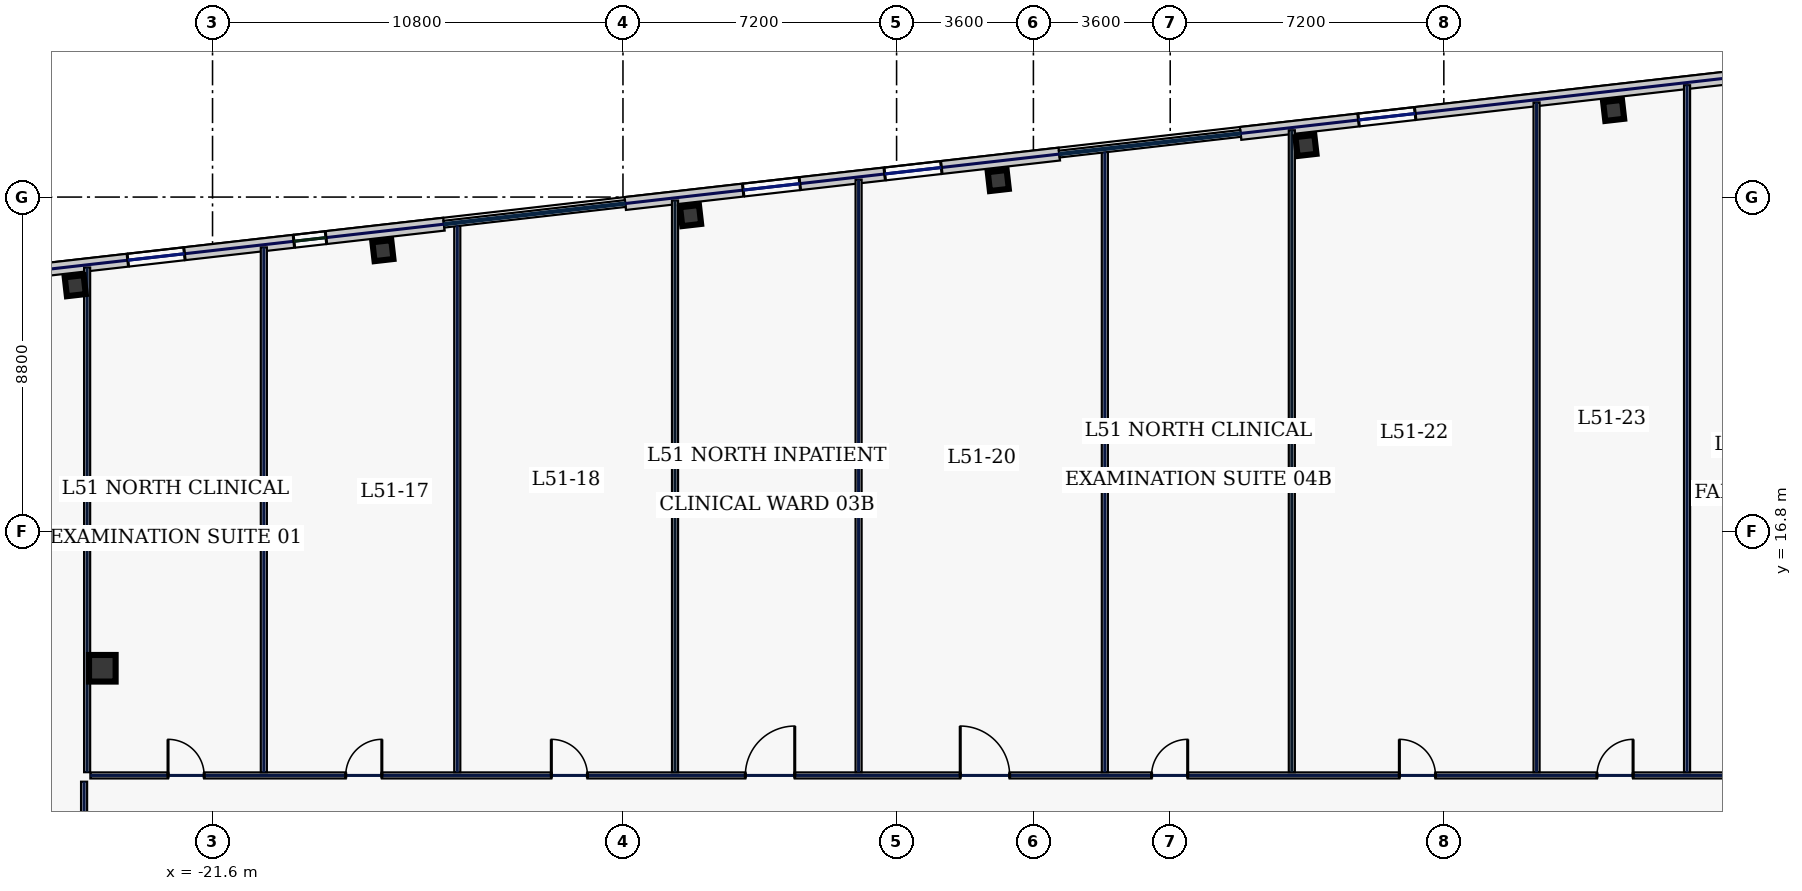
"""IFC4 building model, lengths in metres.
Left out: names, types, materials, properties, quantities, classifications, styles, units other than length and angle.
Written with IfcOpenShell. Run it as: python <this file> out.ifc"""

import sys

from ifc_helpers import new_model, si_unit, direction, frame, frame_2d, origin, origin_2d, place, context, subcontext, project, spatial, rectangle, hollow_rectangle, extrude, element, fill, save


model = new_model("IFC4")
c1 = context("Model", 3, precision=1e-05, world=origin(), true_north=direction((0.0, 1.0)))
c2 = subcontext(c1, "Body", "Model", "MODEL_VIEW")
j1 = project(units=[si_unit("LENGTHUNIT", "METRE"), si_unit("PLANEANGLEUNIT", "RADIAN")], contexts=[c1])
p1 = place(None, origin())
s1 = spatial("IfcSite", under=j1, at=p1, CompositionType="ELEMENT")
p2 = place(p1, origin())
s2 = spatial("IfcBuilding", under=s1, at=p2, CompositionType="ELEMENT")
p3 = place(p2, frame((0.0, 0.0, 222.2)))
s3 = spatial("IfcBuildingStorey", under=s2, at=p3, CompositionType="ELEMENT", Elevation=222.2)
p4 = place(p3, frame((-24.5, 13.2, 0.0), z_axis=(0.0, 0.0, 1.0), x_axis=(1.0, 0.0, 0.0)))
e1 = element("IfcColumn", 1, at=p4, inside=s3, PredefinedType="COLUMN", context=c2, shape_type="SweptSolid", body=[
    extrude(hollow_rectangle(XDim=0.7, YDim=0.7, WallThickness=0.032, at=origin_2d()), origin(), (0.0, 0.0, 1.0), 3.74),
])
for number, where, z_axis, x_axis in (
    (2, (15.269, 27.88, 0.0), (0.0, 0.0, 1.0), (0.994, 0.113, 0.0)),
    (3, (7.172, 26.958, 0.0), (0.0, 0.0, 1.0), (0.994, 0.113, 0.0)),
    (4, (-0.924, 26.035, 0.0), (0.0, 0.0, 1.0), (0.994, 0.113, 0.0)),
    (5, (-9.02, 25.113, 0.0), (0.0, 0.0, 1.0), (0.994, 0.113, 0.0)),
    (6, (-17.116, 24.19, 0.0), (0.0, 0.0, 1.0), (0.994, 0.113, 0.0)),
    (7, (-25.212, 23.268, 0.0), (0.0, 0.0, 1.0), (0.994, 0.113, 0.0)),
):
    element("IfcColumn", number, at=place(p3, frame(where, z_axis=z_axis, x_axis=x_axis)), inside=s3, PredefinedType="COLUMN", context=c2, shape_type="SweptSolid", body=[
        extrude(hollow_rectangle(XDim=0.5, YDim=0.5, WallThickness=0.025, at=origin_2d()), origin(), (0.0, 0.0, 1.0), 3.74),
    ])
p5 = place(p3, frame((23.983, 29.386, 0.0), z_axis=(0.0, 0.0, 1.0), x_axis=(-0.993572271362, -0.113199565282, 0.0)))
e8 = element("IfcWall", 8, at=p5, inside=s3, PredefinedType="STANDARD", context=c2, shape_type="SweptSolid", body=[
    extrude(rectangle(XDim=18.651, YDim=0.34, at=frame_2d((9.326, 0.0))), origin(), (0.0, 0.0, 1.0), 3.74),
])
p6 = place(p5, frame((14.027, 0.0, 0.83)))
e9 = element("IfcOpeningElement", 9, at=p6, cuts=e8, PredefinedType="OPENING", context=c2, shape_type="SweptSolid", body=[
    extrude(rectangle(XDim=1.5, YDim=2.0, at=frame_2d((0.75, 1.0))), frame((0.0, 0.18, 0.0), z_axis=(0.0, -1.0, 0.0), x_axis=(1.0, 0.0, 0.0)), (0.0, 0.0, 1.0), 0.36),
])
p7 = place(p5, frame((2.386, 0.0, 0.83)))
e10 = element("IfcOpeningElement", 10, at=p7, cuts=e8, PredefinedType="OPENING", context=c2, shape_type="SweptSolid", body=[
    extrude(rectangle(XDim=1.5, YDim=2.0, at=frame_2d((0.75, 1.0))), frame((0.0, 0.18, 0.0), z_axis=(0.0, -1.0, 0.0), x_axis=(1.0, 0.0, 0.0)), (0.0, 0.0, 1.0), 0.36),
])
p8 = place(p3, frame((0.682, 26.731, 0.0), z_axis=(0.0, 0.0, 1.0), x_axis=(-0.993571968199, -0.113202226169, 0.0)))
e11 = element("IfcWall", 11, at=p8, inside=s3, PredefinedType="STANDARD", context=c2, shape_type="SweptSolid", body=[
    extrude(rectangle(XDim=11.497, YDim=0.34, at=frame_2d((5.749, 0.0))), origin(), (0.0, 0.0, 1.0), 3.74),
])
p9 = place(p8, frame((6.873, 0.0, 0.83)))
e12 = element("IfcOpeningElement", 12, at=p9, cuts=e11, PredefinedType="OPENING", context=c2, shape_type="SweptSolid", body=[
    extrude(rectangle(XDim=1.5, YDim=2.0, at=frame_2d((0.75, 1.0))), frame((0.0, 0.18, 0.0), z_axis=(0.0, -1.0, 0.0), x_axis=(1.0, 0.0, 0.0)), (0.0, 0.0, 1.0), 0.36),
])
p10 = place(p8, frame((3.125, 0.0, 0.83)))
e13 = element("IfcOpeningElement", 13, at=p10, cuts=e11, PredefinedType="OPENING", context=c2, shape_type="SweptSolid", body=[
    extrude(rectangle(XDim=1.5, YDim=2.0, at=frame_2d((0.75, 1.0))), frame((0.0, 0.18, 0.0), z_axis=(0.0, -1.0, 0.0), x_axis=(1.0, 0.0, 0.0)), (0.0, 0.0, 1.0), 0.36),
])
p11 = place(p3, frame((-15.51, 24.886, 0.0), z_axis=(0.0, 0.0, 1.0), x_axis=(-0.993572271362, -0.113199565282, 0.0)))
e14 = element("IfcWall", 14, at=p11, inside=s3, PredefinedType="STANDARD", context=c2, shape_type="SweptSolid", body=[
    extrude(rectangle(XDim=18.651, YDim=0.34, at=frame_2d((9.326, 0.0))), origin(), (0.0, 0.0, 1.0), 3.74),
])
p12 = place(p11, frame((15.021, 0.0, 0.83)))
e15 = element("IfcOpeningElement", 15, at=p12, cuts=e14, PredefinedType="OPENING", context=c2, shape_type="SweptSolid", body=[
    extrude(rectangle(XDim=1.5, YDim=2.0, at=frame_2d((0.75, 1.0))), frame((0.0, 0.18, 0.0), z_axis=(0.0, -1.0, 0.0), x_axis=(1.0, 0.0, 0.0)), (0.0, 0.0, 1.0), 0.36),
])
p13 = place(p11, frame((11.273, 0.0, 0.83)))
e16 = element("IfcOpeningElement", 16, at=p13, cuts=e14, PredefinedType="OPENING", context=c2, shape_type="SweptSolid", body=[
    extrude(rectangle(XDim=1.5, YDim=2.0, at=frame_2d((0.75, 1.0))), frame((0.0, 0.18, 0.0), z_axis=(0.0, -1.0, 0.0), x_axis=(1.0, 0.0, 0.0)), (0.0, 0.0, 1.0), 0.36),
])
p14 = place(p11, frame((6.873, 0.0, 0.83)))
e17 = element("IfcOpeningElement", 17, at=p14, cuts=e14, PredefinedType="OPENING", context=c2, shape_type="SweptSolid", body=[
    extrude(rectangle(XDim=1.5, YDim=2.0, at=frame_2d((0.75, 1.0))), frame((0.0, 0.18, 0.0), z_axis=(0.0, -1.0, 0.0), x_axis=(1.0, 0.0, 0.0)), (0.0, 0.0, 1.0), 0.36),
])
p15 = place(p11, frame((3.125, 0.0, 0.83)))
e18 = element("IfcOpeningElement", 18, at=p15, cuts=e14, PredefinedType="OPENING", context=c2, shape_type="SweptSolid", body=[
    extrude(rectangle(XDim=0.85, YDim=1.85, at=frame_2d((0.425, 0.925))), frame((0.0, 0.18, 0.0), z_axis=(0.0, -1.0, 0.0), x_axis=(1.0, 0.0, 0.0)), (0.0, 0.0, 1.0), 0.36),
])
p16 = place(p3, frame((-24.98, 7.235, 0.0), z_axis=(0.0, 0.0, 1.0), x_axis=(0.0, 1.0, 0.0)))
e19 = element("IfcWall", 19, at=p16, inside=s3, PredefinedType="PARTITIONING", context=c2, shape_type="SweptSolid", body=[
    extrude(rectangle(XDim=2.98, YDim=0.16, at=frame_2d((1.49, 0.0))), origin(), (0.0, 0.0, 1.0), 3.74),
])
p17 = place(p16, frame((1.1, 0.0, 0.0)))
e20 = element("IfcOpeningElement", 20, at=p17, cuts=e19, PredefinedType="OPENING", context=c2, shape_type="SweptSolid", body=[
    extrude(rectangle(XDim=0.95, YDim=2.2, at=frame_2d((0.475, 1.1))), frame((0.0, 0.09, 0.0), z_axis=(0.0, -1.0, 0.0), x_axis=(1.0, 0.0, 0.0)), (0.0, 0.0, 1.0), 0.18),
])
p18 = place(p3, frame((-24.815, 10.38, 0.0), z_axis=(0.0, 0.0, 1.0), x_axis=(1.0, 0.0, 0.0)))
e21 = element("IfcWall", 21, at=p18, inside=s3, PredefinedType="PARTITIONING", context=c2, shape_type="SweptSolid", body=[
    extrude(rectangle(XDim=49.63, YDim=0.16, at=frame_2d((24.815, 0.0))), origin(), (0.0, 0.0, 1.0), 3.74),
])
p19 = place(p18, frame((2.044, 0.0, 0.0)))
e22 = element("IfcOpeningElement", 22, at=p19, cuts=e21, PredefinedType="OPENING", context=c2, shape_type="SweptSolid", body=[
    extrude(rectangle(XDim=0.95, YDim=2.2, at=frame_2d((0.475, 1.1))), frame((0.0, 0.09, 0.0), z_axis=(0.0, -1.0, 0.0), x_axis=(1.0, 0.0, 0.0)), (0.0, 0.0, 1.0), 0.18),
])
p20 = place(p18, frame((6.72, 0.0, 0.0)))
e23 = element("IfcOpeningElement", 23, at=p20, cuts=e21, PredefinedType="OPENING", context=c2, shape_type="SweptSolid", body=[
    extrude(rectangle(XDim=0.95, YDim=2.2, at=frame_2d((0.475, 1.1))), frame((0.0, 0.09, 0.0), z_axis=(0.0, -1.0, 0.0), x_axis=(1.0, 0.0, 0.0)), (0.0, 0.0, 1.0), 0.18),
])
p21 = place(p18, frame((12.13, 0.0, 0.0)))
e24 = element("IfcOpeningElement", 24, at=p21, cuts=e21, PredefinedType="OPENING", context=c2, shape_type="SweptSolid", body=[
    extrude(rectangle(XDim=0.95, YDim=2.2, at=frame_2d((0.475, 1.1))), frame((0.0, 0.09, 0.0), z_axis=(0.0, -1.0, 0.0), x_axis=(1.0, 0.0, 0.0)), (0.0, 0.0, 1.0), 0.18),
])
p22 = place(p18, frame((17.235, 0.0, 0.0)))
e25 = element("IfcOpeningElement", 25, at=p22, cuts=e21, PredefinedType="OPENING", context=c2, shape_type="SweptSolid", body=[
    extrude(rectangle(XDim=1.3, YDim=2.2, at=frame_2d((0.65, 1.1))), frame((0.0, 0.09, 0.0), z_axis=(0.0, -1.0, 0.0), x_axis=(1.0, 0.0, 0.0)), (0.0, 0.0, 1.0), 0.18),
])
p23 = place(p18, frame((22.89, 0.0, 0.0)))
e26 = element("IfcOpeningElement", 26, at=p23, cuts=e21, PredefinedType="OPENING", context=c2, shape_type="SweptSolid", body=[
    extrude(rectangle(XDim=1.3, YDim=2.2, at=frame_2d((0.65, 1.1))), frame((0.0, 0.09, 0.0), z_axis=(0.0, -1.0, 0.0), x_axis=(1.0, 0.0, 0.0)), (0.0, 0.0, 1.0), 0.18),
])
p24 = place(p18, frame((27.925, 0.0, 0.0)))
e27 = element("IfcOpeningElement", 27, at=p24, cuts=e21, PredefinedType="OPENING", context=c2, shape_type="SweptSolid", body=[
    extrude(rectangle(XDim=0.95, YDim=2.2, at=frame_2d((0.475, 1.1))), frame((0.0, 0.09, 0.0), z_axis=(0.0, -1.0, 0.0), x_axis=(1.0, 0.0, 0.0)), (0.0, 0.0, 1.0), 0.18),
])
p25 = place(p18, frame((34.445, 0.0, 0.0)))
e28 = element("IfcOpeningElement", 28, at=p25, cuts=e21, PredefinedType="OPENING", context=c2, shape_type="SweptSolid", body=[
    extrude(rectangle(XDim=0.95, YDim=2.2, at=frame_2d((0.475, 1.1))), frame((0.0, 0.09, 0.0), z_axis=(0.0, -1.0, 0.0), x_axis=(1.0, 0.0, 0.0)), (0.0, 0.0, 1.0), 0.18),
])
p26 = place(p18, frame((39.645, 0.0, 0.0)))
e29 = element("IfcOpeningElement", 29, at=p26, cuts=e21, PredefinedType="OPENING", context=c2, shape_type="SweptSolid", body=[
    extrude(rectangle(XDim=0.95, YDim=2.2, at=frame_2d((0.475, 1.1))), frame((0.0, 0.09, 0.0), z_axis=(0.0, -1.0, 0.0), x_axis=(1.0, 0.0, 0.0)), (0.0, 0.0, 1.0), 0.18),
])
p27 = place(p18, frame((45.281, 0.0, 0.0)))
e30 = element("IfcOpeningElement", 30, at=p27, cuts=e21, PredefinedType="OPENING", context=c2, shape_type="SweptSolid", body=[
    extrude(rectangle(XDim=0.95, YDim=2.2, at=frame_2d((0.475, 1.1))), frame((0.0, 0.09, 0.0), z_axis=(0.0, -1.0, 0.0), x_axis=(1.0, 0.0, 0.0)), (0.0, 0.0, 1.0), 0.18),
])
p28 = place(p3, frame((-24.9, 10.465, 0.0), z_axis=(0.0, 0.0, 1.0), x_axis=(0.0, 1.0, 0.0)))
e31 = element("IfcWall", 31, at=p28, inside=s3, PredefinedType="PARTITIONING", context=c2, shape_type="SweptSolid", body=[
    extrude(rectangle(XDim=13.281, YDim=0.16, at=frame_2d((6.641, 0.0))), origin(), (0.0, 0.0, 1.0), 2.135),
])
p29 = place(p3, frame((-20.25, 10.465, 0.0), z_axis=(0.0, 0.0, 1.0), x_axis=(0.0, 1.0, 0.0)))
e32 = element("IfcWall", 32, at=p29, inside=s3, PredefinedType="PARTITIONING", context=c2, shape_type="SweptSolid", body=[
    extrude(rectangle(XDim=13.811, YDim=0.16, at=frame_2d((6.906, 0.0))), origin(), (0.0, 0.0, 1.0), 3.74),
])
p30 = place(p3, frame((-15.16, 10.465, 0.0), z_axis=(0.0, 0.0, 1.0), x_axis=(0.0, 1.0, 0.0)))
e33 = element("IfcWall", 33, at=p30, inside=s3, PredefinedType="PARTITIONING", context=c2, shape_type="SweptSolid", body=[
    extrude(rectangle(XDim=14.391, YDim=0.16, at=frame_2d((7.195, 0.0))), origin(), (0.0, 0.0, 1.0), 3.74),
])
p31 = place(p3, frame((-4.6, 10.465, 0.0), z_axis=(0.0, 0.0, 1.0), x_axis=(0.0, 1.0, 0.0)))
e34 = element("IfcWall", 34, at=p31, inside=s3, PredefinedType="PARTITIONING", context=c2, shape_type="SweptSolid", body=[
    extrude(rectangle(XDim=15.594, YDim=0.16, at=frame_2d((7.797, 0.0))), origin(), (0.0, 0.0, 1.0), 3.74),
])
p32 = place(p3, frame((6.8, 10.465, 0.0), z_axis=(0.0, 0.0, 1.0), x_axis=(0.0, 1.0, 0.0)))
e35 = element("IfcWall", 35, at=p32, inside=s3, PredefinedType="PARTITIONING", context=c2, shape_type="SweptSolid", body=[
    extrude(rectangle(XDim=16.893, YDim=0.16, at=frame_2d((8.446, 0.0))), origin(), (0.0, 0.0, 1.0), 1.535),
])
p33 = place(p3, frame((17.2, 10.465, 0.0), z_axis=(0.0, 0.0, 1.0), x_axis=(0.0, 1.0, 0.0)))
e36 = element("IfcWall", 36, at=p33, inside=s3, PredefinedType="PARTITIONING", context=c2, shape_type="SweptSolid", body=[
    extrude(rectangle(XDim=18.078, YDim=0.16, at=frame_2d((9.039, 0.0))), origin(), (0.0, 0.0, 1.0), 3.74),
])
p34 = place(p3, frame((-9.43, 10.465, 0.0), z_axis=(0.0, 0.0, 1.0), x_axis=(0.0, 1.0, 0.0)))
e37 = element("IfcWall", 37, at=p34, inside=s3, PredefinedType="PARTITIONING", context=c2, shape_type="SweptSolid", body=[
    extrude(rectangle(XDim=15.044, YDim=0.16, at=frame_2d((7.522, 0.0))), origin(), (0.0, 0.0, 1.0), 1.535),
])
p35 = place(p3, frame((1.88, 10.465, 0.0), z_axis=(0.0, 0.0, 1.0), x_axis=(0.0, 1.0, 0.0)))
e38 = element("IfcWall", 38, at=p35, inside=s3, PredefinedType="PARTITIONING", context=c2, shape_type="SweptSolid", body=[
    extrude(rectangle(XDim=16.333, YDim=0.16, at=frame_2d((8.166, 0.0))), origin(), (0.0, 0.0, 1.0), 3.74),
])
p36 = place(p3, frame((13.24, 10.465, 0.0), z_axis=(0.0, 0.0, 1.0), x_axis=(0.0, 1.0, 0.0)))
e39 = element("IfcWall", 39, at=p36, inside=s3, PredefinedType="PARTITIONING", context=c2, shape_type="SweptSolid", body=[
    extrude(rectangle(XDim=17.627, YDim=0.16, at=frame_2d((8.813, 0.0))), origin(), (0.0, 0.0, 1.0), 3.74),
])
p37 = place(p6, origin())
e40 = element("IfcWindow", 40, at=p37, inside=s3, PartitioningType="SINGLE_PANEL", PredefinedType="WINDOW", context=c2, shape_type="SweptSolid", body=[
    extrude(rectangle(XDim=1.5, YDim=2.0, at=frame_2d((0.75, 1.0))), frame((0.0, 0.03, 0.0), z_axis=(0.0, -1.0, 0.0), x_axis=(1.0, 0.0, 0.0)), (0.0, 0.0, 1.0), 0.06),
])
fill(e9, e40)
p38 = place(p9, origin())
e41 = element("IfcWindow", 41, at=p38, inside=s3, PartitioningType="SINGLE_PANEL", PredefinedType="WINDOW", context=c2, shape_type="SweptSolid", body=[
    extrude(rectangle(XDim=1.5, YDim=2.0, at=frame_2d((0.75, 1.0))), frame((0.0, 0.03, 0.0), z_axis=(0.0, -1.0, 0.0), x_axis=(1.0, 0.0, 0.0)), (0.0, 0.0, 1.0), 0.06),
])
fill(e12, e41)
p39 = place(p10, origin())
e42 = element("IfcWindow", 42, at=p39, inside=s3, PartitioningType="SINGLE_PANEL", PredefinedType="WINDOW", context=c2, shape_type="SweptSolid", body=[
    extrude(rectangle(XDim=1.5, YDim=2.0, at=frame_2d((0.75, 1.0))), frame((0.0, 0.03, 0.0), z_axis=(0.0, -1.0, 0.0), x_axis=(1.0, 0.0, 0.0)), (0.0, 0.0, 1.0), 0.06),
])
fill(e13, e42)
p40 = place(p14, origin())
e43 = element("IfcWindow", 43, at=p40, inside=s3, PartitioningType="SINGLE_PANEL", PredefinedType="WINDOW", context=c2, shape_type="SweptSolid", body=[
    extrude(rectangle(XDim=1.5, YDim=2.0, at=frame_2d((0.75, 1.0))), frame((0.0, 0.03, 0.0), z_axis=(0.0, -1.0, 0.0), x_axis=(1.0, 0.0, 0.0)), (0.0, 0.0, 1.0), 0.06),
])
fill(e17, e43)
p41 = place(p15, origin())
e44 = element("IfcWindow", 44, at=p41, inside=s3, PartitioningType="SINGLE_PANEL", PredefinedType="WINDOW", context=c2, shape_type="SweptSolid", body=[
    extrude(rectangle(XDim=0.85, YDim=1.85, at=frame_2d((0.425, 0.925))), frame((0.0, 0.03, 0.0), z_axis=(0.0, -1.0, 0.0), x_axis=(1.0, 0.0, 0.0)), (0.0, 0.0, 1.0), 0.06),
])
fill(e18, e44)
p42 = place(p19, origin())
e45 = element("IfcDoor", 45, at=p42, inside=s3, OperationType="SINGLE_SWING_LEFT", PredefinedType="DOOR", context=c2, shape_type="SweptSolid", body=[
    extrude(rectangle(XDim=0.95, YDim=2.2, at=frame_2d((0.475, 1.1))), frame((0.0, 0.025, 0.0), z_axis=(0.0, -1.0, 0.0), x_axis=(1.0, 0.0, 0.0)), (0.0, 0.0, 1.0), 0.05),
])
fill(e22, e45)
p43 = place(p20, origin())
e46 = element("IfcDoor", 46, at=p43, inside=s3, OperationType="SINGLE_SWING_RIGHT", PredefinedType="DOOR", context=c2, shape_type="SweptSolid", body=[
    extrude(rectangle(XDim=0.95, YDim=2.2, at=frame_2d((0.475, 1.1))), frame((0.0, 0.025, 0.0), z_axis=(0.0, -1.0, 0.0), x_axis=(1.0, 0.0, 0.0)), (0.0, 0.0, 1.0), 0.05),
])
fill(e23, e46)
p44 = place(p21, origin())
e47 = element("IfcDoor", 47, at=p44, inside=s3, OperationType="SINGLE_SWING_LEFT", PredefinedType="DOOR", context=c2, shape_type="SweptSolid", body=[
    extrude(rectangle(XDim=0.95, YDim=2.2, at=frame_2d((0.475, 1.1))), frame((0.0, 0.025, 0.0), z_axis=(0.0, -1.0, 0.0), x_axis=(1.0, 0.0, 0.0)), (0.0, 0.0, 1.0), 0.05),
])
fill(e24, e47)
p45 = place(p22, origin())
e48 = element("IfcDoor", 48, at=p45, inside=s3, OperationType="SINGLE_SWING_RIGHT", PredefinedType="DOOR", context=c2, shape_type="SweptSolid", body=[
    extrude(rectangle(XDim=1.3, YDim=2.2, at=frame_2d((0.65, 1.1))), frame((0.0, 0.025, 0.0), z_axis=(0.0, -1.0, 0.0), x_axis=(1.0, 0.0, 0.0)), (0.0, 0.0, 1.0), 0.05),
])
fill(e25, e48)
p46 = place(p23, origin())
e49 = element("IfcDoor", 49, at=p46, inside=s3, OperationType="SINGLE_SWING_LEFT", PredefinedType="DOOR", context=c2, shape_type="SweptSolid", body=[
    extrude(rectangle(XDim=1.3, YDim=2.2, at=frame_2d((0.65, 1.1))), frame((0.0, 0.025, 0.0), z_axis=(0.0, -1.0, 0.0), x_axis=(1.0, 0.0, 0.0)), (0.0, 0.0, 1.0), 0.05),
])
fill(e26, e49)
p47 = place(p24, origin())
e50 = element("IfcDoor", 50, at=p47, inside=s3, OperationType="SINGLE_SWING_RIGHT", PredefinedType="DOOR", context=c2, shape_type="SweptSolid", body=[
    extrude(rectangle(XDim=0.95, YDim=2.2, at=frame_2d((0.475, 1.1))), frame((0.0, 0.025, 0.0), z_axis=(0.0, -1.0, 0.0), x_axis=(1.0, 0.0, 0.0)), (0.0, 0.0, 1.0), 0.05),
])
fill(e27, e50)
p48 = place(p25, origin())
e51 = element("IfcDoor", 51, at=p48, inside=s3, OperationType="SINGLE_SWING_LEFT", PredefinedType="DOOR", context=c2, shape_type="SweptSolid", body=[
    extrude(rectangle(XDim=0.95, YDim=2.2, at=frame_2d((0.475, 1.1))), frame((0.0, 0.025, 0.0), z_axis=(0.0, -1.0, 0.0), x_axis=(1.0, 0.0, 0.0)), (0.0, 0.0, 1.0), 0.05),
])
fill(e28, e51)
p49 = place(p26, origin())
e52 = element("IfcDoor", 52, at=p49, inside=s3, OperationType="SINGLE_SWING_RIGHT", PredefinedType="DOOR", context=c2, shape_type="SweptSolid", body=[
    extrude(rectangle(XDim=0.95, YDim=2.2, at=frame_2d((0.475, 1.1))), frame((0.0, 0.025, 0.0), z_axis=(0.0, -1.0, 0.0), x_axis=(1.0, 0.0, 0.0)), (0.0, 0.0, 1.0), 0.05),
])
fill(e29, e52)
save(model, sys.argv[1])
